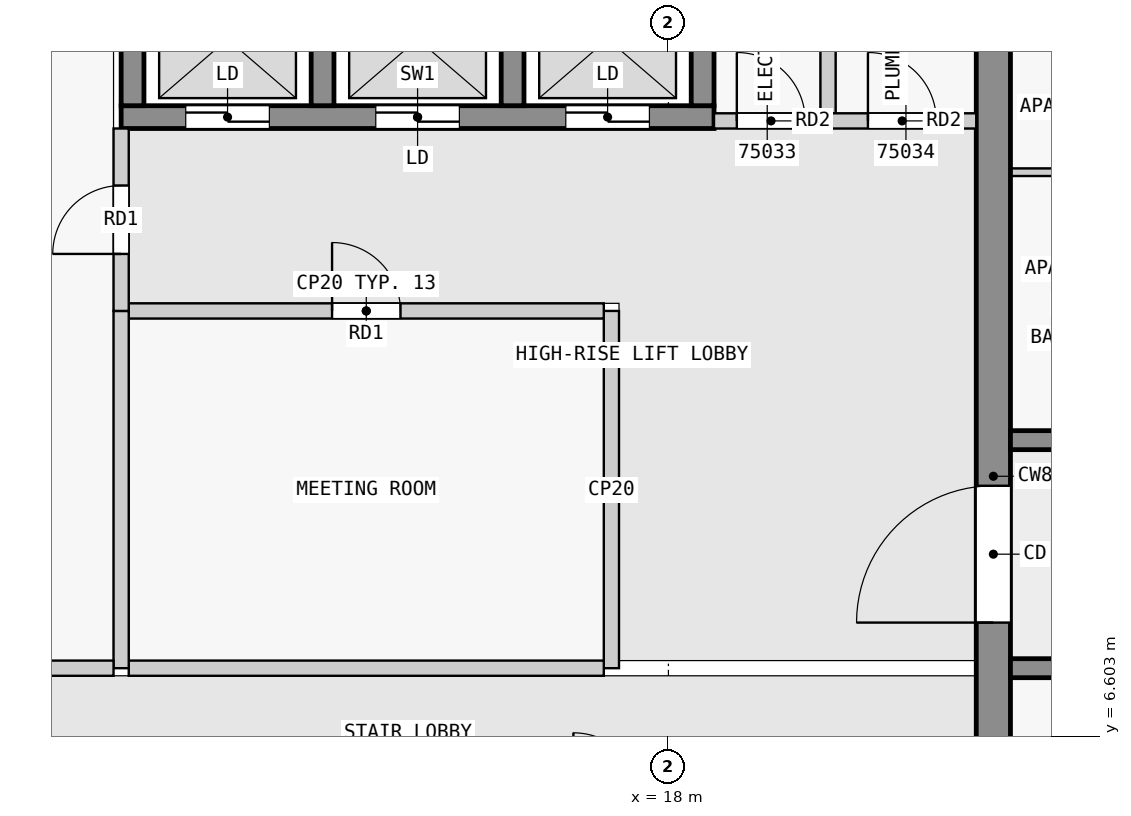
"""IFC4 building model, lengths in metres.
Left out: names, types, materials, properties, quantities, classifications, styles, units other than length and angle.
Written with IfcOpenShell. Run it as: python <this file> out.ifc"""

import sys

from ifc_helpers import new_model, si_unit, direction, frame, frame_2d, origin, place, context, subcontext, project, spatial, rectangle, extrude, element, fill, save


model = new_model("IFC4")
c1 = context("Model", 3, precision=1e-05, world=origin(), true_north=direction((0.0, 1.0)))
c2 = subcontext(c1, "Body", "Model", "MODEL_VIEW")
j1 = project(units=[si_unit("LENGTHUNIT", "METRE"), si_unit("PLANEANGLEUNIT", "RADIAN")], contexts=[c1])
p1 = place(None, origin())
s1 = spatial("IfcSite", under=j1, at=p1, CompositionType="ELEMENT")
p2 = place(p1, origin())
s2 = spatial("IfcBuilding", under=s1, at=p2, CompositionType="ELEMENT")
p3 = place(p2, frame((0.0, 0.0, 284.4)))
s3 = spatial("IfcBuildingStorey", under=s2, at=p3, CompositionType="ELEMENT", Elevation=284.4)
p4 = place(p3, frame((22.275, 2.5, 0.0), z_axis=(0.0, 0.0, 1.0), x_axis=(0.0, 1.0, 0.0)))
e1 = element("IfcWall", 1, at=p4, inside=s3, PredefinedType="SHEAR", context=c2, shape_type="SweptSolid", body=[
    extrude(rectangle(XDim=15.05, YDim=0.45, at=frame_2d((7.525, 0.0))), origin(), (0.0, 0.0, 1.0), 3.05),
])
p5 = place(p4, frame((5.6, 0.0, 0.0)))
e2 = element("IfcOpeningElement", 2, at=p5, cuts=e1, PredefinedType="OPENING", context=c2, shape_type="SweptSolid", body=[
    extrude(rectangle(XDim=1.8, YDim=2.1, at=frame_2d((0.9, 1.05))), frame((0.0, 0.235, 0.0), z_axis=(0.0, -1.0, 0.0), x_axis=(1.0, 0.0, 0.0)), (0.0, 0.0, 1.0), 0.47),
])
p6 = place(p3, frame((10.8, 14.75, 0.0), z_axis=(0.0, 0.0, 1.0), x_axis=(1.0, 0.0, 0.0)))
e3 = element("IfcWall", 3, at=p6, inside=s3, PredefinedType="SHEAR", context=c2, shape_type="SweptSolid", body=[
    extrude(rectangle(XDim=7.8, YDim=0.3, at=frame_2d((3.9, 0.0))), origin(), (0.0, 0.0, 1.0), 3.05),
])
p7 = place(p6, frame((0.85, 0.0, 0.0)))
e4 = element("IfcOpeningElement", 4, at=p7, cuts=e3, PredefinedType="OPENING", context=c2, shape_type="SweptSolid", body=[
    extrude(rectangle(XDim=1.1, YDim=2.1, at=frame_2d((0.55, 1.05))), frame((0.0, 0.16, 0.0), z_axis=(0.0, -1.0, 0.0), x_axis=(1.0, 0.0, 0.0)), (0.0, 0.0, 1.0), 0.32),
])
p8 = place(p6, frame((3.35, 0.0, 0.0)))
e5 = element("IfcOpeningElement", 5, at=p8, cuts=e3, PredefinedType="OPENING", context=c2, shape_type="SweptSolid", body=[
    extrude(rectangle(XDim=1.1, YDim=2.1, at=frame_2d((0.55, 1.05))), frame((0.0, 0.16, 0.0), z_axis=(0.0, -1.0, 0.0), x_axis=(1.0, 0.0, 0.0)), (0.0, 0.0, 1.0), 0.32),
])
p9 = place(p6, frame((5.85, 0.0, 0.0)))
e6 = element("IfcOpeningElement", 6, at=p9, cuts=e3, PredefinedType="OPENING", context=c2, shape_type="SweptSolid", body=[
    extrude(rectangle(XDim=1.1, YDim=2.1, at=frame_2d((0.55, 1.05))), frame((0.0, 0.16, 0.0), z_axis=(0.0, -1.0, 0.0), x_axis=(1.0, 0.0, 0.0)), (0.0, 0.0, 1.0), 0.32),
])
for number, where, z_axis, x_axis in (
    (7, (10.95, 14.9, 0.0), (0.0, 0.0, 1.0), (0.0, 1.0, 0.0)),
    (8, (13.45, 14.9, 0.0), (0.0, 0.0, 1.0), (0.0, 1.0, 0.0)),
    (9, (15.95, 14.9, 0.0), (0.0, 0.0, 1.0), (0.0, 1.0, 0.0)),
    (10, (18.45, 14.9, 0.0), (0.0, 0.0, 1.0), (0.0, 1.0, 0.0)),
):
    element("IfcWall", number, at=place(p3, frame(where, z_axis=z_axis, x_axis=x_axis)), inside=s3, PredefinedType="SHEAR", context=c2, shape_type="SweptSolid", body=[
        extrude(rectangle(XDim=2.0, YDim=0.3, at=frame_2d((1.0, 0.0))), origin(), (0.0, 0.0, 1.0), 3.05),
    ])
p10 = place(p3, frame((22.5, 7.5, 0.0), z_axis=(0.0, 0.0, 1.0), x_axis=(1.0, 0.0, 0.0)))
e11 = element("IfcWall", 11, at=p10, inside=s3, PredefinedType="SHEAR", context=c2, shape_type="SweptSolid", body=[
    extrude(rectangle(XDim=22.5, YDim=0.25, at=frame_2d((11.25, 0.0))), origin(), (0.0, 0.0, 1.0), 3.05),
])
p11 = place(p10, frame((1.75, 0.0, 0.0)))
e12 = element("IfcOpeningElement", 12, at=p11, cuts=e11, PredefinedType="OPENING", context=c2, shape_type="SweptSolid", body=[
    extrude(rectangle(XDim=1.0, YDim=2.1, at=frame_2d((0.5, 1.05))), frame((0.0, 0.135, 0.0), z_axis=(0.0, -1.0, 0.0), x_axis=(1.0, 0.0, 0.0)), (0.0, 0.0, 1.0), 0.27),
])
p12 = place(p10, frame((8.55, 0.0, 0.0)))
e13 = element("IfcOpeningElement", 13, at=p12, cuts=e11, PredefinedType="OPENING", context=c2, shape_type="SweptSolid", body=[
    extrude(rectangle(XDim=1.0, YDim=2.1, at=frame_2d((0.5, 1.05))), frame((0.0, 0.135, 0.0), z_axis=(0.0, -1.0, 0.0), x_axis=(1.0, 0.0, 0.0)), (0.0, 0.0, 1.0), 0.27),
])
p13 = place(p10, frame((15.25, 0.0, 0.0)))
e14 = element("IfcOpeningElement", 14, at=p13, cuts=e11, PredefinedType="OPENING", context=c2, shape_type="SweptSolid", body=[
    extrude(rectangle(XDim=1.0, YDim=2.1, at=frame_2d((0.5, 1.05))), frame((0.0, 0.135, 0.0), z_axis=(0.0, -1.0, 0.0), x_axis=(1.0, 0.0, 0.0)), (0.0, 0.0, 1.0), 0.27),
])
p14 = place(p10, frame((18.75, 0.0, 0.0)))
e15 = element("IfcOpeningElement", 15, at=p14, cuts=e11, PredefinedType="OPENING", context=c2, shape_type="SweptSolid", body=[
    extrude(rectangle(XDim=0.9, YDim=2.1, at=frame_2d((0.45, 1.05))), frame((0.0, 0.135, 0.0), z_axis=(0.0, -1.0, 0.0), x_axis=(1.0, 0.0, 0.0)), (0.0, 0.0, 1.0), 0.27),
])
p15 = place(p10, frame((20.95, 0.0, 0.0)))
e16 = element("IfcOpeningElement", 16, at=p15, cuts=e11, PredefinedType="OPENING", context=c2, shape_type="SweptSolid", body=[
    extrude(rectangle(XDim=1.0, YDim=2.1, at=frame_2d((0.5, 1.05))), frame((0.0, 0.135, 0.0), z_axis=(0.0, -1.0, 0.0), x_axis=(1.0, 0.0, 0.0)), (0.0, 0.0, 1.0), 0.27),
])
p16 = place(p3, frame((22.5, 10.5, 0.0), z_axis=(0.0, 0.0, 1.0), x_axis=(1.0, 0.0, 0.0)))
e17 = element("IfcWall", 17, at=p16, inside=s3, PredefinedType="SHEAR", context=c2, shape_type="SweptSolid", body=[
    extrude(rectangle(XDim=22.5, YDim=0.25, at=frame_2d((11.25, 0.0))), origin(), (0.0, 0.0, 1.0), 3.05),
])
p17 = place(p16, frame((4.05, 0.0, 0.0)))
e18 = element("IfcOpeningElement", 18, at=p17, cuts=e17, PredefinedType="OPENING", context=c2, shape_type="SweptSolid", body=[
    extrude(rectangle(XDim=1.0, YDim=2.1, at=frame_2d((0.5, 1.05))), frame((0.0, 0.135, 0.0), z_axis=(0.0, -1.0, 0.0), x_axis=(1.0, 0.0, 0.0)), (0.0, 0.0, 1.0), 0.27),
])
p18 = place(p16, frame((10.35, 0.0, 0.0)))
e19 = element("IfcOpeningElement", 19, at=p18, cuts=e17, PredefinedType="OPENING", context=c2, shape_type="SweptSolid", body=[
    extrude(rectangle(XDim=1.8, YDim=2.1, at=frame_2d((0.9, 1.05))), frame((0.0, 0.135, 0.0), z_axis=(0.0, -1.0, 0.0), x_axis=(1.0, 0.0, 0.0)), (0.0, 0.0, 1.0), 0.27),
])
p19 = place(p16, frame((16.85, 0.0, 0.0)))
e20 = element("IfcOpeningElement", 20, at=p19, cuts=e17, PredefinedType="OPENING", context=c2, shape_type="SweptSolid", body=[
    extrude(rectangle(XDim=1.0, YDim=2.1, at=frame_2d((0.5, 1.05))), frame((0.0, 0.135, 0.0), z_axis=(0.0, -1.0, 0.0), x_axis=(1.0, 0.0, 0.0)), (0.0, 0.0, 1.0), 0.27),
])
p20 = place(p3, frame((7.1, 7.5, 0.0), z_axis=(0.0, 0.0, 1.0), x_axis=(1.0, 0.0, 0.0)))
e21 = element("IfcWall", 21, at=p20, inside=s3, PredefinedType="PARTITIONING", context=c2, shape_type="SweptSolid", body=[
    extrude(rectangle(XDim=3.6, YDim=0.2, at=frame_2d((1.8, 0.0))), origin(), (0.0, 0.0, 1.0), 3.05),
])
p21 = place(p3, frame((10.8, 12.2, 0.0), z_axis=(0.0, 0.0, 1.0), x_axis=(0.0, 1.0, 0.0)))
e22 = element("IfcWall", 22, at=p21, inside=s3, PredefinedType="PARTITIONING", context=c2, shape_type="SweptSolid", body=[
    extrude(rectangle(XDim=2.4, YDim=0.2, at=frame_2d((1.2, 0.0))), origin(), (0.0, 0.0, 1.0), 3.05),
])
p22 = place(p21, frame((0.75, 0.0, 0.0)))
e23 = element("IfcOpeningElement", 23, at=p22, cuts=e22, PredefinedType="OPENING", context=c2, shape_type="SweptSolid", body=[
    extrude(rectangle(XDim=0.9, YDim=2.1, at=frame_2d((0.45, 1.05))), frame((0.0, 0.11, 0.0), z_axis=(0.0, -1.0, 0.0), x_axis=(1.0, 0.0, 0.0)), (0.0, 0.0, 1.0), 0.22),
])
p23 = place(p3, frame((10.8, 7.5, 0.0), z_axis=(0.0, 0.0, 1.0), x_axis=(0.0, 1.0, 0.0)))
e24 = element("IfcWall", 24, at=p23, inside=s3, PredefinedType="PARTITIONING", context=c2, shape_type="SweptSolid", body=[
    extrude(rectangle(XDim=4.7, YDim=0.2, at=frame_2d((2.35, 0.0))), origin(), (0.0, 0.0, 1.0), 3.05),
])
p24 = place(p3, frame((10.9, 7.5, 0.0), z_axis=(0.0, 0.0, 1.0), x_axis=(1.0, 0.0, 0.0)))
e25 = element("IfcWall", 25, at=p24, inside=s3, PredefinedType="PARTITIONING", context=c2, shape_type="SweptSolid", body=[
    extrude(rectangle(XDim=6.25, YDim=0.2, at=frame_2d((3.125, 0.0))), origin(), (0.0, 0.0, 1.0), 3.05),
])
p25 = place(p3, frame((17.25, 7.5, 0.0), z_axis=(0.0, 0.0, 1.0), x_axis=(0.0, 1.0, 0.0)))
e26 = element("IfcWall", 26, at=p25, inside=s3, PredefinedType="PARTITIONING", context=c2, shape_type="SweptSolid", body=[
    extrude(rectangle(XDim=4.7, YDim=0.2, at=frame_2d((2.35, 0.0))), origin(), (0.0, 0.0, 1.0), 3.05),
])
p26 = place(p3, frame((10.9, 12.2, 0.0), z_axis=(0.0, 0.0, 1.0), x_axis=(1.0, 0.0, 0.0)))
e27 = element("IfcWall", 27, at=p26, inside=s3, PredefinedType="PARTITIONING", context=c2, shape_type="SweptSolid", body=[
    extrude(rectangle(XDim=6.25, YDim=0.2, at=frame_2d((3.125, 0.0))), origin(), (0.0, 0.0, 1.0), 3.05),
])
p27 = place(p26, frame((2.675, 0.0, 0.0)))
e28 = element("IfcOpeningElement", 28, at=p27, cuts=e27, PredefinedType="OPENING", context=c2, shape_type="SweptSolid", body=[
    extrude(rectangle(XDim=0.9, YDim=2.1, at=frame_2d((0.45, 1.05))), frame((0.0, 0.11, 0.0), z_axis=(0.0, -1.0, 0.0), x_axis=(1.0, 0.0, 0.0)), (0.0, 0.0, 1.0), 0.22),
])
p28 = place(p3, frame((18.6, 14.7, 0.0), z_axis=(0.0, 0.0, 1.0), x_axis=(1.0, 0.0, 0.0)))
e29 = element("IfcWall", 29, at=p28, inside=s3, PredefinedType="PARTITIONING", context=c2, shape_type="SweptSolid", body=[
    extrude(rectangle(XDim=3.45, YDim=0.2, at=frame_2d((1.725, 0.0))), origin(), (0.0, 0.0, 1.0), 3.05),
])
p29 = place(p28, frame((0.3, 0.0, 0.0)))
e30 = element("IfcOpeningElement", 30, at=p29, cuts=e29, PredefinedType="OPENING", context=c2, shape_type="SweptSolid", body=[
    extrude(rectangle(XDim=0.9, YDim=2.1, at=frame_2d((0.45, 1.05))), frame((0.0, 0.11, 0.0), z_axis=(0.0, -1.0, 0.0), x_axis=(1.0, 0.0, 0.0)), (0.0, 0.0, 1.0), 0.22),
])
p30 = place(p28, frame((2.025, 0.0, 0.0)))
e31 = element("IfcOpeningElement", 31, at=p30, cuts=e29, PredefinedType="OPENING", context=c2, shape_type="SweptSolid", body=[
    extrude(rectangle(XDim=0.9, YDim=2.1, at=frame_2d((0.45, 1.05))), frame((0.0, 0.11, 0.0), z_axis=(0.0, -1.0, 0.0), x_axis=(1.0, 0.0, 0.0)), (0.0, 0.0, 1.0), 0.22),
])
p31 = place(p3, frame((20.1, 14.8, 0.0), z_axis=(0.0, 0.0, 1.0), x_axis=(0.0, 1.0, 0.0)))
e32 = element("IfcWall", 32, at=p31, inside=s3, PredefinedType="PARTITIONING", context=c2, shape_type="SweptSolid", body=[
    extrude(rectangle(XDim=2.75, YDim=0.2, at=frame_2d((1.375, 0.0))), origin(), (0.0, 0.0, 1.0), 3.05),
])
p32 = place(p3, frame((24.25, 14.025, 0.0), z_axis=(0.0, 0.0, 1.0), x_axis=(-1.0, 0.0, 0.0)))
e33 = element("IfcWall", 33, at=p32, inside=s3, PredefinedType="PARTITIONING", context=c2, shape_type="SweptSolid", body=[
    extrude(rectangle(XDim=1.75, YDim=0.1, at=frame_2d((0.875, 0.0))), origin(), (0.0, 0.0, 1.0), 3.05),
])
p33 = place(p22, origin())
e34 = element("IfcDoor", 34, at=p33, inside=s3, OperationType="SINGLE_SWING_LEFT", PredefinedType="DOOR", context=c2, shape_type="SweptSolid", body=[
    extrude(rectangle(XDim=0.9, YDim=2.1, at=frame_2d((0.45, 1.05))), frame((0.0, 0.025, 0.0), z_axis=(0.0, -1.0, 0.0), x_axis=(1.0, 0.0, 0.0)), (0.0, 0.0, 1.0), 0.05),
])
fill(e23, e34)
p34 = place(p27, origin())
e35 = element("IfcDoor", 35, at=p34, inside=s3, OperationType="SINGLE_SWING_LEFT", PredefinedType="DOOR", context=c2, shape_type="SweptSolid", body=[
    extrude(rectangle(XDim=0.9, YDim=2.1, at=frame_2d((0.45, 1.05))), frame((0.0, 0.025, 0.0), z_axis=(0.0, -1.0, 0.0), x_axis=(1.0, 0.0, 0.0)), (0.0, 0.0, 1.0), 0.05),
])
fill(e28, e35)
p35 = place(p7, origin())
e36 = element("IfcDoor", 36, at=p35, inside=s3, OperationType="DOUBLE_DOOR_SLIDING", PredefinedType="DOOR", context=c2, shape_type="SweptSolid", body=[
    extrude(rectangle(XDim=1.1, YDim=2.1, at=frame_2d((0.55, 1.05))), frame((0.0, 0.025, 0.0), z_axis=(0.0, -1.0, 0.0), x_axis=(1.0, 0.0, 0.0)), (0.0, 0.0, 1.0), 0.05),
])
fill(e4, e36)
p36 = place(p8, origin())
e37 = element("IfcDoor", 37, at=p36, inside=s3, OperationType="DOUBLE_DOOR_SLIDING", PredefinedType="DOOR", context=c2, shape_type="SweptSolid", body=[
    extrude(rectangle(XDim=1.1, YDim=2.1, at=frame_2d((0.55, 1.05))), frame((0.0, 0.025, 0.0), z_axis=(0.0, -1.0, 0.0), x_axis=(1.0, 0.0, 0.0)), (0.0, 0.0, 1.0), 0.05),
])
fill(e5, e37)
p37 = place(p9, origin())
e38 = element("IfcDoor", 38, at=p37, inside=s3, OperationType="DOUBLE_DOOR_SLIDING", PredefinedType="DOOR", context=c2, shape_type="SweptSolid", body=[
    extrude(rectangle(XDim=1.1, YDim=2.1, at=frame_2d((0.55, 1.05))), frame((0.0, 0.025, 0.0), z_axis=(0.0, -1.0, 0.0), x_axis=(1.0, 0.0, 0.0)), (0.0, 0.0, 1.0), 0.05),
])
fill(e6, e38)
p38 = place(p5, origin())
e39 = element("IfcDoor", 39, at=p38, inside=s3, OperationType="DOUBLE_DOOR_SINGLE_SWING", PredefinedType="DOOR", context=c2, shape_type="SweptSolid", body=[
    extrude(rectangle(XDim=1.8, YDim=2.1, at=frame_2d((0.9, 1.05))), frame((0.0, 0.025, 0.0), z_axis=(0.0, -1.0, 0.0), x_axis=(1.0, 0.0, 0.0)), (0.0, 0.0, 1.0), 0.05),
])
fill(e2, e39)
p39 = place(p29, origin())
e40 = element("IfcDoor", 40, at=p39, inside=s3, OperationType="SINGLE_SWING_LEFT", PredefinedType="DOOR", context=c2, shape_type="SweptSolid", body=[
    extrude(rectangle(XDim=0.9, YDim=2.1, at=frame_2d((0.45, 1.05))), frame((0.0, 0.025, 0.0), z_axis=(0.0, -1.0, 0.0), x_axis=(1.0, 0.0, 0.0)), (0.0, 0.0, 1.0), 0.05),
])
fill(e30, e40)
p40 = place(p30, origin())
e41 = element("IfcDoor", 41, at=p40, inside=s3, OperationType="SINGLE_SWING_LEFT", PredefinedType="DOOR", context=c2, shape_type="SweptSolid", body=[
    extrude(rectangle(XDim=0.9, YDim=2.1, at=frame_2d((0.45, 1.05))), frame((0.0, 0.025, 0.0), z_axis=(0.0, -1.0, 0.0), x_axis=(1.0, 0.0, 0.0)), (0.0, 0.0, 1.0), 0.05),
])
fill(e31, e41)
save(model, sys.argv[1])
